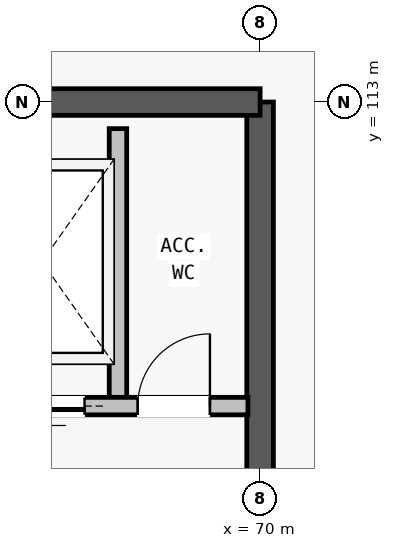
"""IFC4 building model, lengths in metres.
Left out: names, types, materials, properties, quantities, classifications, styles, units other than length and angle.
Written with IfcOpenShell. Run it as: python <this file> out.ifc"""

import sys

from ifc_helpers import new_model, si_unit, direction, frame, frame_2d, origin, place, context, subcontext, project, spatial, rectangle, extrude, element, fill, save


model = new_model("IFC4")
c1 = context("Model", 3, precision=1e-05, world=origin(), true_north=direction((0.0, 1.0)))
c2 = subcontext(c1, "Body", "Model", "MODEL_VIEW")
j1 = project(units=[si_unit("LENGTHUNIT", "METRE"), si_unit("PLANEANGLEUNIT", "RADIAN")], contexts=[c1])
p1 = place(None, origin())
s1 = spatial("IfcSite", under=j1, at=p1, CompositionType="ELEMENT")
p2 = place(p1, origin())
s2 = spatial("IfcBuilding", under=s1, at=p2, CompositionType="ELEMENT")
p3 = place(p2, origin())
s3 = spatial("IfcBuildingStorey", under=s2, at=p3, CompositionType="ELEMENT", Elevation=0.0)
p4 = place(p3, frame((70.0, 104.0, -0.9), z_axis=(0.0, 0.0, 1.0), x_axis=(0.0, 1.0, 0.0)))
e1 = element("IfcWall", 1, at=p4, inside=s3, PredefinedType="SHEAR", context=c2, shape_type="SweptSolid", body=[
    extrude(rectangle(XDim=9.0, YDim=0.35, at=frame_2d((4.5, 0.0))), origin(), (0.0, 0.0, 1.0), 6.22),
])
p5 = place(p4, frame((1.4, 0.0, 0.9)))
e2 = element("IfcOpeningElement", 2, at=p5, cuts=e1, PredefinedType="OPENING", context=c2, shape_type="SweptSolid", body=[
    extrude(rectangle(XDim=1.9, YDim=2.3, at=frame_2d((0.95, 1.15))), frame((0.0, 0.185, 0.0), z_axis=(0.0, -1.0, 0.0), x_axis=(1.0, 0.0, 0.0)), (0.0, 0.0, 1.0), 0.37),
])
p6 = place(p3, frame((70.0, 113.0, -0.9), z_axis=(0.0, 0.0, 1.0), x_axis=(-1.0, 0.0, 0.0)))
e3 = element("IfcWall", 3, at=p6, inside=s3, PredefinedType="SHEAR", context=c2, shape_type="SweptSolid", body=[
    extrude(rectangle(XDim=8.0, YDim=0.35, at=frame_2d((4.0, 0.0))), origin(), (0.0, 0.0, 1.0), 6.22),
])
p7 = place(p3, frame((68.13, 109.0, 0.0), z_axis=(0.0, 0.0, 1.0), x_axis=(0.0, 1.0, 0.0)))
e4 = element("IfcWall", 4, at=p7, inside=s3, PredefinedType="PARTITIONING", context=c2, shape_type="SweptSolid", body=[
    extrude(rectangle(XDim=3.65, YDim=0.23, at=frame_2d((1.825, 0.0))), origin(), (0.0, 0.0, 1.0), 4.2),
])
p8 = place(p3, frame((66.21, 109.0, 0.0), z_axis=(0.0, 0.0, 1.0), x_axis=(1.0, 0.0, 0.0)))
e5 = element("IfcWall", 5, at=p8, inside=s3, PredefinedType="PARTITIONING", context=c2, shape_type="SweptSolid", body=[
    extrude(rectangle(XDim=3.63, YDim=0.23, at=frame_2d((1.815, 0.0))), origin(), (0.0, 0.0, 1.0), 4.2),
])
p9 = place(p8, frame((0.38, 0.0, 0.0)))
e6 = element("IfcOpeningElement", 6, at=p9, cuts=e5, PredefinedType="OPENING", context=c2, shape_type="SweptSolid", body=[
    extrude(rectangle(XDim=1.1, YDim=2.15, at=frame_2d((0.55, 1.075))), frame((0.0, 0.125, 0.0), z_axis=(0.0, -1.0, 0.0), x_axis=(1.0, 0.0, 0.0)), (0.0, 0.0, 1.0), 0.25),
])
p10 = place(p8, frame((2.18, 0.0, 0.0)))
e7 = element("IfcOpeningElement", 7, at=p10, cuts=e5, PredefinedType="OPENING", context=c2, shape_type="SweptSolid", body=[
    extrude(rectangle(XDim=0.95, YDim=2.1, at=frame_2d((0.475, 1.05))), frame((0.0, 0.125, 0.0), z_axis=(0.0, -1.0, 0.0), x_axis=(1.0, 0.0, 0.0)), (0.0, 0.0, 1.0), 0.25),
])
p11 = place(p9, origin())
e8 = element("IfcDoor", 8, at=p11, inside=s3, OperationType="SLIDING_TO_LEFT", PredefinedType="DOOR", context=c2, shape_type="SweptSolid", body=[
    extrude(rectangle(XDim=1.1, YDim=2.15, at=frame_2d((0.55, 1.075))), frame((0.0, 0.025, 0.0), z_axis=(0.0, -1.0, 0.0), x_axis=(1.0, 0.0, 0.0)), (0.0, 0.0, 1.0), 0.05),
])
fill(e6, e8)
p12 = place(p10, origin())
e9 = element("IfcDoor", 9, at=p12, inside=s3, OperationType="SINGLE_SWING_RIGHT", PredefinedType="DOOR", context=c2, shape_type="SweptSolid", body=[
    extrude(rectangle(XDim=0.95, YDim=2.1, at=frame_2d((0.475, 1.05))), frame((0.0, 0.025, 0.0), z_axis=(0.0, -1.0, 0.0), x_axis=(1.0, 0.0, 0.0)), (0.0, 0.0, 1.0), 0.05),
])
fill(e7, e9)
save(model, sys.argv[1])
